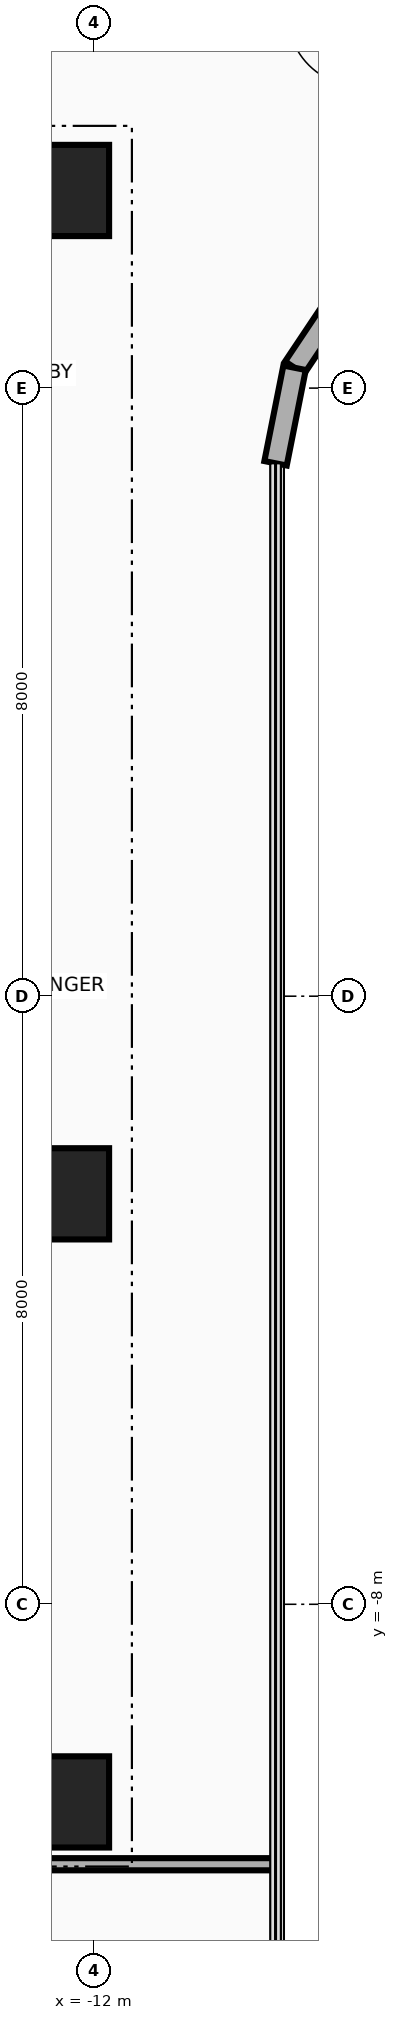
"""IFC4 building model, lengths in metres.
Left out: names, types, materials, properties, quantities, classifications, styles, units other than length and angle.
Written with IfcOpenShell. Run it as: python <this file> out.ifc"""

import sys

from ifc_helpers import new_model, si_unit, direction, frame, frame_2d, origin, origin_2d, place, context, subcontext, project, spatial, rectangle, extrude, source, transform, mapped, element, save


model = new_model("IFC4")
c1 = context("Model", 3, precision=1e-05, world=origin(), true_north=direction((0.0, 1.0)))
c2 = subcontext(c1, "Body", "Model", "MODEL_VIEW")
j1 = project(units=[si_unit("LENGTHUNIT", "METRE"), si_unit("PLANEANGLEUNIT", "RADIAN")], contexts=[c1])
p1 = place(None, origin())
s1 = spatial("IfcSite", under=j1, at=p1, CompositionType="ELEMENT")
p2 = place(p1, origin())
s2 = spatial("IfcBuilding", under=s1, at=p2, CompositionType="ELEMENT")
p3 = place(p2, frame((0.0, 0.0, 116.8)))
s3 = spatial("IfcBuildingStorey", under=s2, at=p3, CompositionType="ELEMENT", Elevation=116.8)
for number, where, z_axis, x_axis in (
    (1, (-22.65, 10.8, 0.0), (0.0, 0.0, 1.0), (1.0, 0.0, 0.0)),
    (2, (-22.65, -10.8, 0.0), (0.0, 0.0, 1.0), (1.0, 0.0, 0.0)),
):
    element("IfcWall", number, at=place(p3, frame(where, z_axis=z_axis, x_axis=x_axis)), inside=s3, PredefinedType="SHEAR", context=c2, shape_type="SweptSolid", body=[
        extrude(rectangle(XDim=10.25, YDim=0.7, at=frame_2d((5.125, 0.0))), origin(), (0.0, 0.0, 1.0), 3.46),
    ])
m1 = source(origin(), c2, "Body", "SweptSolid", [
    extrude(rectangle(XDim=1.2, YDim=1.2, at=origin_2d()), origin(), (0.0, 0.0, 1.0), 3.7),
])
for number, where, z_axis, x_axis in (
    (3, (-12.4, -10.6, 0.0), (0.0, 0.0, 1.0), (1.0, 0.0, 0.0)),
    (4, (-12.4, -2.6, 0.0), (0.0, 0.0, 1.0), (1.0, 0.0, 0.0)),
    (5, (-12.4, 10.6, 0.0), (0.0, 0.0, 1.0), (1.0, 0.0, 0.0)),
):
    element("IfcColumn", number, at=place(p3, frame(where, z_axis=z_axis, x_axis=x_axis)), inside=s3, PredefinedType="COLUMN", context=c2, shape_type="MappedRepresentation", body=[
        mapped(m1, transform((0.0, 0.0, 0.0), x_axis=(1.0, 0.0, 0.0), y_axis=(0.0, 1.0, 0.0), z_axis=(0.0, 0.0, 1.0), scale=1.0)),
    ])
p4 = place(p3, frame((-8.642, 9.342, 0.0), z_axis=(0.0, 0.0, 1.0), x_axis=(-0.555615398575, -0.831439431869, 0.0)))
e6 = element("IfcWall", 6, at=p4, inside=s3, PredefinedType="SOLIDWALL", context=c2, shape_type="SweptSolid", body=[
    extrude(rectangle(XDim=1.292, YDim=0.3, at=frame_2d((0.646, 0.0))), origin(), (0.0, 0.0, 1.0), 3.46),
])
p5 = place(p3, frame((-9.36, 8.268, 0.0), z_axis=(0.0, 0.0, 1.0), x_axis=(-0.195090163074, -0.980785312019, 0.0)))
e7 = element("IfcWall", 7, at=p5, inside=s3, PredefinedType="SOLIDWALL", context=c2, shape_type="SweptSolid", body=[
    extrude(rectangle(XDim=1.281, YDim=0.3, at=frame_2d((0.641, 0.0))), origin(), (0.0, 0.0, 1.0), 3.46),
])
p6 = place(p3, frame((-23.45, -11.42, 0.0), z_axis=(0.0, 0.0, 1.0), x_axis=(1.0, 0.0, 0.0)))
e8 = element("IfcWall", 8, at=p6, inside=s3, PredefinedType="PARTITIONING", context=c2, shape_type="SweptSolid", body=[
    extrude(rectangle(XDim=13.84, YDim=0.16, at=frame_2d((6.92, 0.0))), origin(), (0.0, 0.0, 1.0), 2.834),
])
save(model, sys.argv[1])
